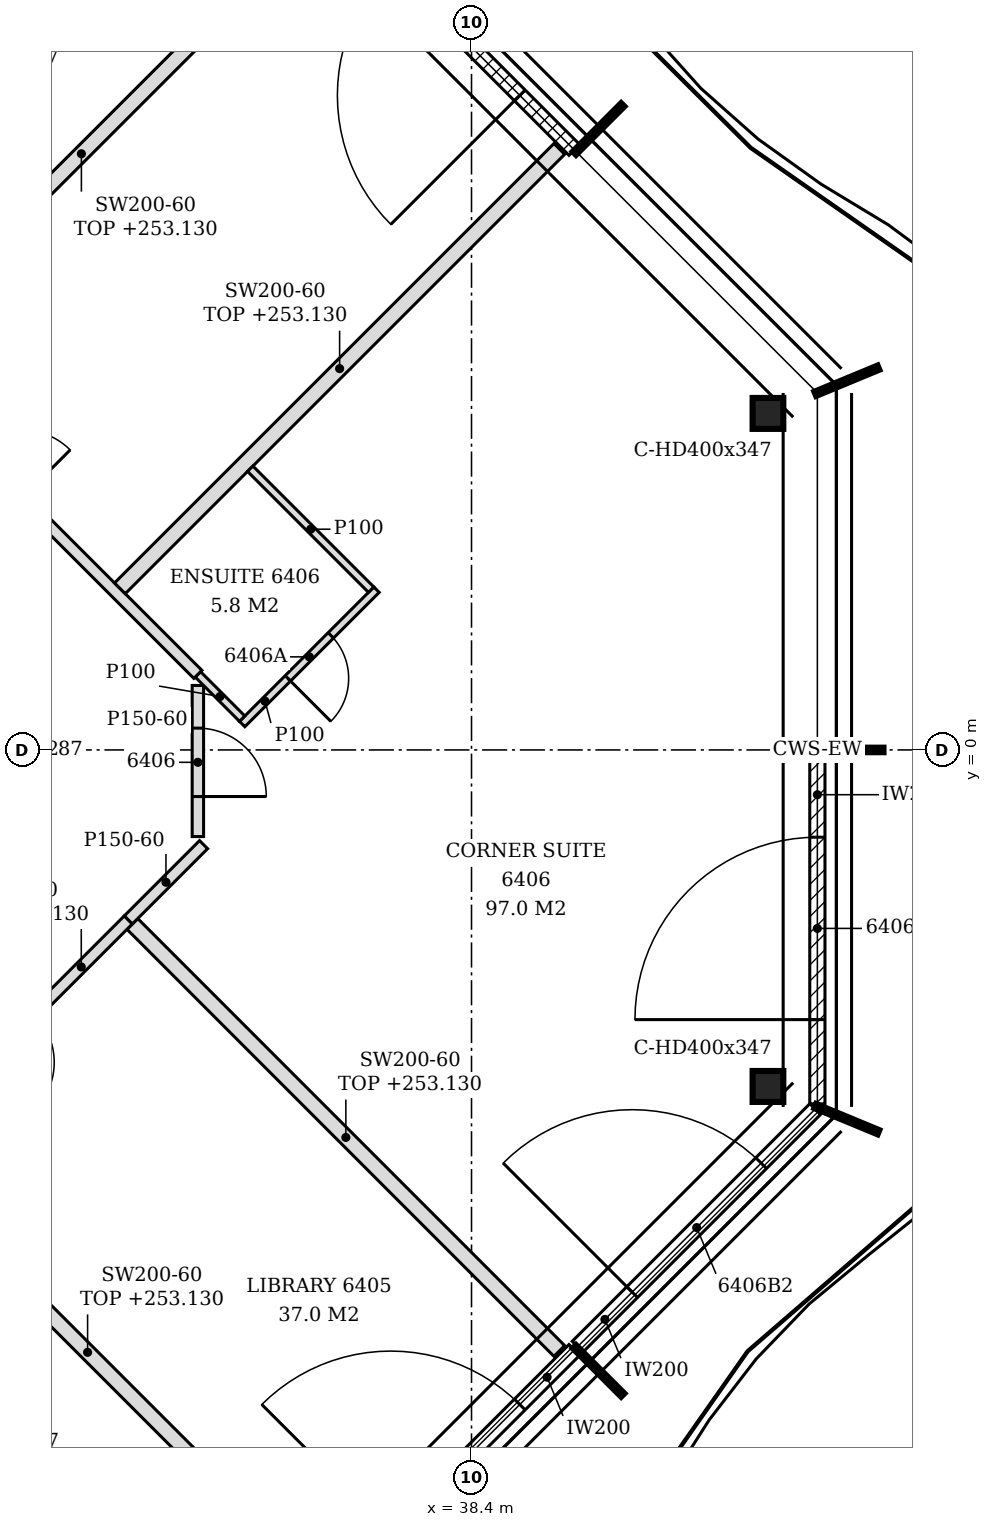
"""IFC4 building model, lengths in metres.
Left out: names, types, materials, properties, quantities, classifications, styles, units other than length and angle.
Written with IfcOpenShell. Run it as: python <this file> out.ifc"""

import sys

from ifc_helpers import new_model, si_unit, direction, frame, frame_2d, origin, origin_2d, place, context, subcontext, project, spatial, polyline, rectangle, i_section, outline, extrude, element, fill, save


model = new_model("IFC4")
c1 = context("Model", 3, precision=1e-05, world=origin(), true_north=direction((0.0, 1.0)))
c2 = subcontext(c1, "Body", "Model", "MODEL_VIEW")
j1 = project(units=[si_unit("LENGTHUNIT", "METRE"), si_unit("PLANEANGLEUNIT", "RADIAN")], contexts=[c1])
p1 = place(None, origin())
s1 = spatial("IfcSite", under=j1, at=p1, CompositionType="ELEMENT")
p2 = place(p1, origin())
s2 = spatial("IfcBuilding", under=s1, at=p2, CompositionType="ELEMENT")
p3 = place(p2, frame((0.0, 0.0, 250.2)))
s3 = spatial("IfcBuildingStorey", under=s2, at=p3, CompositionType="ELEMENT", Elevation=250.2)
for number, where, z_axis, x_axis in (
    (1, (42.3, -4.427, -0.15), (0.0, 0.0, 1.0), (1.0, 0.0, 0.0)),
    (2, (42.3, 4.427, -0.15), (0.0, 0.0, 1.0), (1.0, 0.0, 0.0)),
):
    element("IfcColumn", number, at=place(p3, frame(where, z_axis=z_axis, x_axis=x_axis)), inside=s3, PredefinedType="COLUMN", context=c2, shape_type="SweptSolid", body=[
        extrude(i_section(OverallWidth=0.404, OverallDepth=0.407, WebThickness=0.027, FlangeThickness=0.044, FilletRadius=0.015, at=origin_2d()), origin(), (0.0, 0.0, 1.0), 3.6),
    ])
p4 = place(p3, frame((36.62, -11.026, 0.0), z_axis=(0.0, 0.0, 1.0), x_axis=(0.707106781187, 0.707106781187, 0.0)))
e3 = element("IfcWall", 3, at=p4, inside=s3, PredefinedType="NOTDEFINED", context=c2, shape_type="SweptSolid", body=[
    extrude(rectangle(XDim=4.431, YDim=0.2, at=frame_2d((2.215, 0.0))), origin(), (0.0, 0.0, 1.0), 3.45),
])
p5 = place(p4, frame((1.015, 0.0, 0.0)))
e4 = element("IfcOpeningElement", 4, at=p5, cuts=e3, PredefinedType="OPENING", context=c2, shape_type="SweptSolid", body=[
    extrude(rectangle(XDim=2.4, YDim=2.4, at=frame_2d((1.2, 1.2))), frame((0.0, 0.11, 0.0), z_axis=(0.0, -1.0, 0.0), x_axis=(1.0, 0.0, 0.0)), (0.0, 0.0, 1.0), 0.22),
])
p6 = place(p3, frame((39.796, -7.851, 0.0), z_axis=(0.0, 0.0, 1.0), x_axis=(0.707079168996, 0.707134392299, 0.0)))
e5 = element("IfcWall", 5, at=p6, inside=s3, PredefinedType="NOTDEFINED", context=c2, shape_type="SweptSolid", body=[
    extrude(rectangle(XDim=4.421, YDim=0.2, at=frame_2d((2.21, 0.0))), origin(), (0.0, 0.0, 1.0), 3.45),
])
p7 = place(p6, frame((1.016, 0.0, 0.0)))
e6 = element("IfcOpeningElement", 6, at=p7, cuts=e5, PredefinedType="OPENING", context=c2, shape_type="SweptSolid", body=[
    extrude(rectangle(XDim=2.4, YDim=2.4, at=frame_2d((1.2, 1.2))), frame((0.0, 0.11, 0.0), z_axis=(0.0, -1.0, 0.0), x_axis=(1.0, 0.0, 0.0)), (0.0, 0.0, 1.0), 0.22),
])
p8 = place(p3, frame((42.95, -4.656, 0.0), z_axis=(0.0, 0.0, 1.0), x_axis=(0.0, 1.0, 0.0)))
e7 = element("IfcWall", 7, at=p8, inside=s3, PredefinedType="NOTDEFINED", context=c2, shape_type="SweptSolid", body=[
    extrude(rectangle(XDim=4.626, YDim=0.2, at=frame_2d((2.313, 0.0))), origin(), (0.0, 0.0, 1.0), 3.45),
])
p9 = place(p8, frame((1.108, 0.0, 0.0)))
e8 = element("IfcOpeningElement", 8, at=p9, cuts=e7, PredefinedType="OPENING", context=c2, shape_type="SweptSolid", body=[
    extrude(rectangle(XDim=2.4, YDim=2.4, at=frame_2d((1.2, 1.2))), frame((0.0, 0.11, 0.0), z_axis=(0.0, -1.0, 0.0), x_axis=(1.0, 0.0, 0.0)), (0.0, 0.0, 1.0), 0.22),
])
p10 = place(p3, frame((39.753, 7.893, 0.0), z_axis=(0.0, 0.0, 1.0), x_axis=(-0.707106781187, 0.707106781187, 0.0)))
e9 = element("IfcWall", 9, at=p10, inside=s3, PredefinedType="NOTDEFINED", context=c2, shape_type="SweptSolid", body=[
    extrude(rectangle(XDim=4.431, YDim=0.2, at=frame_2d((2.215, 0.0))), origin(), (0.0, 0.0, 1.0), 3.45),
])
p11 = place(p10, frame((1.015, 0.0, 0.0)))
e10 = element("IfcOpeningElement", 10, at=p11, cuts=e9, PredefinedType="OPENING", context=c2, shape_type="SweptSolid", body=[
    extrude(rectangle(XDim=2.4, YDim=2.4, at=frame_2d((1.2, 1.2))), frame((0.0, 0.11, 0.0), z_axis=(0.0, -1.0, 0.0), x_axis=(1.0, 0.0, 0.0)), (0.0, 0.0, 1.0), 0.22),
])
p12 = place(p3, frame((35.873, -10.449, 0.0), z_axis=(0.0, 0.0, 1.0), x_axis=(-0.707089680867, 0.707123881093, 0.0)))
e11 = element("IfcWall", 11, at=p12, inside=s3, PredefinedType="PARTITIONING", context=c2, shape_type="SweptSolid", body=[
    extrude(rectangle(XDim=7.139, YDim=0.2, at=frame_2d((3.569, 0.0))), origin(), (0.0, 0.0, 1.0), 2.93),
])
p13 = place(p3, frame((39.555, -7.907, 0.0), z_axis=(0.0, 0.0, 1.0), x_axis=(-0.707060685068, 0.7071528743, 0.0)))
e12 = element("IfcWall", 12, at=p13, inside=s3, PredefinedType="PARTITIONING", context=c2, shape_type="SweptSolid", body=[
    extrude(rectangle(XDim=7.945, YDim=0.2, at=frame_2d((3.972, 0.0))), origin(), (0.0, 0.0, 1.0), 2.93),
])
p14 = place(p3, frame((30.772, -5.348, 0.0), z_axis=(0.0, 0.0, 1.0), x_axis=(0.70724543229, 0.706968102891, 0.0)))
e13 = element("IfcWall", 13, at=p14, inside=s3, PredefinedType="PARTITIONING", context=c2, shape_type="SweptSolid", body=[
    extrude(rectangle(XDim=4.402, YDim=0.15, at=frame_2d((2.201, 0.0))), origin(), (0.0, 0.0, 1.0), 2.93),
])
p15 = place(p14, frame((1.751, 0.0, 0.0)))
e14 = element("IfcOpeningElement", 14, at=p15, cuts=e13, PredefinedType="OPENING", context=c2, shape_type="SweptSolid", body=[
    extrude(rectangle(XDim=0.9, YDim=2.1, at=frame_2d((0.45, 1.05))), frame((0.0, 0.085, 0.0), z_axis=(0.0, -1.0, 0.0), x_axis=(1.0, 0.0, 0.0)), (0.0, 0.0, 1.0), 0.17),
])
p16 = place(p3, frame((33.885, -2.236, 0.0), z_axis=(0.0, 0.0, 1.0), x_axis=(0.707106781187, 0.707106781187, 0.0)))
e15 = element("IfcWall", 15, at=p16, inside=s3, PredefinedType="PARTITIONING", context=c2, shape_type="SweptSolid", body=[
    extrude(rectangle(XDim=1.4, YDim=0.15, at=frame_2d((0.7, 0.0))), origin(), (0.0, 0.0, 1.0), 3.45),
])
p17 = place(p3, frame((34.8, -1.14, 0.0), z_axis=(0.0, 0.0, 1.0), x_axis=(0.0, 1.0, 0.0)))
e16 = element("IfcWall", 16, at=p17, inside=s3, PredefinedType="PARTITIONING", context=c2, shape_type="SweptSolid", body=[
    extrude(outline(polyline([(0.0, 0.0), (1.988, 0.0), (1.988, 3.45), (1.245, 3.45), (1.243, 2.88), (1.035, 2.88), (1.033, 3.45), (0.0, 3.45), (0.0, 0.0)])), frame((0.0, 0.075, 0.0), z_axis=(0.0, -1.0, 0.0), x_axis=(1.0, 0.0, 0.0)), (0.0, 0.0, 1.0), 0.15),
])
p18 = place(p17, frame((0.527, 0.0, 0.0)))
e17 = element("IfcOpeningElement", 17, at=p18, cuts=e16, PredefinedType="OPENING", context=c2, shape_type="SweptSolid", body=[
    extrude(rectangle(XDim=0.9, YDim=2.1, at=frame_2d((0.45, 1.05))), frame((0.0, 0.085, 0.0), z_axis=(0.0, -1.0, 0.0), x_axis=(1.0, 0.0, 0.0)), (0.0, 0.0, 1.0), 0.17),
])
p19 = place(p3, frame((35.383, 0.341, 0.0), z_axis=(0.0, 0.0, 1.0), x_axis=(0.707106781187, 0.707106781187, 0.0)))
e18 = element("IfcWall", 18, at=p19, inside=s3, PredefinedType="PARTITIONING", context=c2, shape_type="SweptSolid", body=[
    extrude(rectangle(XDim=2.5, YDim=0.1, at=frame_2d((1.25, 0.0))), origin(), (0.0, 0.0, 1.0), 3.45),
])
p20 = place(p19, frame((0.85, 0.0, 0.0)))
e19 = element("IfcOpeningElement", 19, at=p20, cuts=e18, PredefinedType="OPENING", context=c2, shape_type="SweptSolid", body=[
    extrude(rectangle(XDim=0.8, YDim=2.1, at=frame_2d((0.4, 1.05))), frame((0.0, 0.06, 0.0), z_axis=(0.0, -1.0, 0.0), x_axis=(1.0, 0.0, 0.0)), (0.0, 0.0, 1.0), 0.12),
])
p21 = place(p3, frame((35.383, 0.411, 0.0), z_axis=(0.0, 0.0, 1.0), x_axis=(-0.707106781187, 0.707106781187, 0.0)))
e20 = element("IfcWall", 20, at=p21, inside=s3, PredefinedType="PARTITIONING", context=c2, shape_type="SweptSolid", body=[
    extrude(rectangle(XDim=0.824, YDim=0.1, at=frame_2d((0.412, 0.0))), origin(), (0.0, 0.0, 1.0), 3.45),
])
p22 = place(p3, frame((34.8, 0.994, 0.0), z_axis=(0.0, 0.0, 1.0), x_axis=(-0.707099634543, 0.707113927758, 0.0)))
e21 = element("IfcWall", 21, at=p22, inside=s3, PredefinedType="PARTITIONING", context=c2, shape_type="SweptSolid", body=[
    extrude(rectangle(XDim=17.081, YDim=0.15, at=frame_2d((8.541, 0.0))), origin(), (0.0, 0.0, 1.0), 2.88),
])
p23 = place(p22, frame((3.276, 0.0, 0.0)))
e22 = element("IfcOpeningElement", 22, at=p23, cuts=e21, PredefinedType="OPENING", context=c2, shape_type="SweptSolid", body=[
    extrude(rectangle(XDim=0.9, YDim=2.1, at=frame_2d((0.45, 1.05))), frame((0.0, 0.085, 0.0), z_axis=(0.0, -1.0, 0.0), x_axis=(1.0, 0.0, 0.0)), (0.0, 0.0, 1.0), 0.17),
])
p24 = place(p22, frame((6.829, 0.0, 0.0)))
e23 = element("IfcOpeningElement", 23, at=p24, cuts=e21, PredefinedType="OPENING", context=c2, shape_type="SweptSolid", body=[
    extrude(rectangle(XDim=0.9, YDim=2.1, at=frame_2d((0.45, 1.05))), frame((0.0, 0.085, 0.0), z_axis=(0.0, -1.0, 0.0), x_axis=(1.0, 0.0, 0.0)), (0.0, 0.0, 1.0), 0.17),
])
p25 = place(p22, frame((11.23, 0.0, 0.0)))
e24 = element("IfcOpeningElement", 24, at=p25, cuts=e21, PredefinedType="OPENING", context=c2, shape_type="SweptSolid", body=[
    extrude(rectangle(XDim=0.9, YDim=2.1, at=frame_2d((0.45, 1.05))), frame((0.0, 0.085, 0.0), z_axis=(0.0, -1.0, 0.0), x_axis=(1.0, 0.0, 0.0)), (0.0, 0.0, 1.0), 0.17),
])
p26 = place(p3, frame((33.774, 2.126, 0.0), z_axis=(0.0, 0.0, 1.0), x_axis=(0.707121711178, 0.70709185088, 0.0)))
e25 = element("IfcWall", 25, at=p26, inside=s3, PredefinedType="PARTITIONING", context=c2, shape_type="SweptSolid", body=[
    extrude(rectangle(XDim=8.176, YDim=0.2, at=frame_2d((4.088, 0.0))), origin(), (0.0, 0.0, 1.0), 2.93),
])
p27 = place(p3, frame((37.08, 2.108, 0.0), z_axis=(0.0, 0.0, 1.0), x_axis=(-0.707106781187, 0.707106781187, 0.0)))
e26 = element("IfcWall", 26, at=p27, inside=s3, PredefinedType="PARTITIONING", context=c2, shape_type="SweptSolid", body=[
    extrude(rectangle(XDim=2.25, YDim=0.1, at=frame_2d((1.125, 0.0))), origin(), (0.0, 0.0, 1.0), 3.45),
])
p28 = place(p3, frame((30.662, 5.238, 0.0), z_axis=(0.0, 0.0, 1.0), x_axis=(0.707106781187, 0.707106781187, 0.0)))
e27 = element("IfcWall", 27, at=p28, inside=s3, PredefinedType="PARTITIONING", context=c2, shape_type="SweptSolid", body=[
    extrude(rectangle(XDim=7.369, YDim=0.2, at=frame_2d((3.685, 0.0))), origin(), (0.0, 0.0, 1.0), 2.93),
])
p29 = place(p5, origin())
e28 = element("IfcDoor", 28, at=p29, inside=s3, OperationType="SINGLE_SWING_LEFT", PredefinedType="DOOR", context=c2, shape_type="SweptSolid", body=[
    extrude(rectangle(XDim=2.4, YDim=2.4, at=frame_2d((1.2, 1.2))), frame((0.0, 0.025, 0.0), z_axis=(0.0, -1.0, 0.0), x_axis=(1.0, 0.0, 0.0)), (0.0, 0.0, 1.0), 0.05),
])
fill(e4, e28)
p30 = place(p7, origin())
e29 = element("IfcDoor", 29, at=p30, inside=s3, OperationType="SINGLE_SWING_LEFT", PredefinedType="DOOR", context=c2, shape_type="SweptSolid", body=[
    extrude(rectangle(XDim=2.4, YDim=2.4, at=frame_2d((1.2, 1.2))), frame((0.0, 0.025, 0.0), z_axis=(0.0, -1.0, 0.0), x_axis=(1.0, 0.0, 0.0)), (0.0, 0.0, 1.0), 0.05),
])
fill(e6, e29)
p31 = place(p9, origin())
e30 = element("IfcDoor", 30, at=p31, inside=s3, OperationType="SINGLE_SWING_LEFT", PredefinedType="DOOR", context=c2, shape_type="SweptSolid", body=[
    extrude(rectangle(XDim=2.4, YDim=2.4, at=frame_2d((1.2, 1.2))), frame((0.0, 0.025, 0.0), z_axis=(0.0, -1.0, 0.0), x_axis=(1.0, 0.0, 0.0)), (0.0, 0.0, 1.0), 0.05),
])
fill(e8, e30)
p32 = place(p11, origin())
e31 = element("IfcDoor", 31, at=p32, inside=s3, OperationType="SINGLE_SWING_LEFT", PredefinedType="DOOR", context=c2, shape_type="SweptSolid", body=[
    extrude(rectangle(XDim=2.4, YDim=2.4, at=frame_2d((1.2, 1.2))), frame((0.0, 0.025, 0.0), z_axis=(0.0, -1.0, 0.0), x_axis=(1.0, 0.0, 0.0)), (0.0, 0.0, 1.0), 0.05),
])
fill(e10, e31)
p33 = place(p18, frame((0.9, 0.0, 0.0), z_axis=(0.0, 0.0, 1.0), x_axis=(-1.0, 0.0, 0.0)))
e32 = element("IfcDoor", 32, at=p33, inside=s3, OperationType="SINGLE_SWING_RIGHT", PredefinedType="DOOR", context=c2, shape_type="SweptSolid", body=[
    extrude(rectangle(XDim=0.9, YDim=2.1, at=frame_2d((0.45, 1.05))), frame((0.0, 0.025, 0.0), z_axis=(0.0, -1.0, 0.0), x_axis=(1.0, 0.0, 0.0)), (0.0, 0.0, 1.0), 0.05),
])
fill(e17, e32)
p34 = place(p20, frame((0.8, 0.0, 0.0), z_axis=(0.0, 0.0, 1.0), x_axis=(-1.0, 0.0, 0.0)))
e33 = element("IfcDoor", 33, at=p34, inside=s3, OperationType="SINGLE_SWING_RIGHT", PredefinedType="DOOR", context=c2, shape_type="SweptSolid", body=[
    extrude(rectangle(XDim=0.8, YDim=2.1, at=frame_2d((0.4, 1.05))), frame((0.0, 0.025, 0.0), z_axis=(0.0, -1.0, 0.0), x_axis=(1.0, 0.0, 0.0)), (0.0, 0.0, 1.0), 0.05),
])
fill(e19, e33)
save(model, sys.argv[1])
